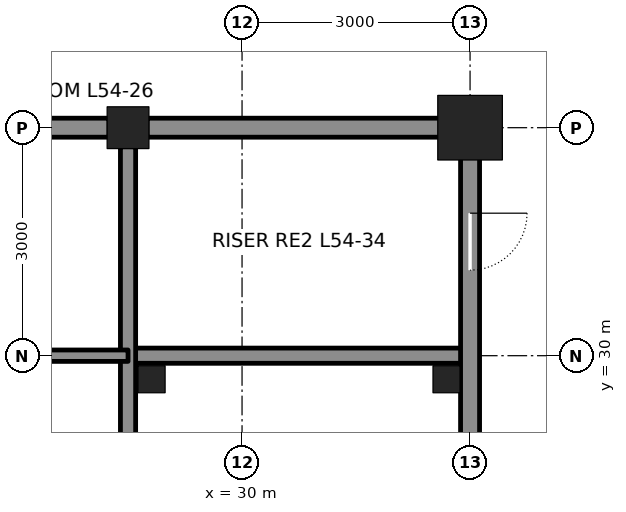
"""IFC4 building model, lengths in metres.
Left out: names, types, materials, properties, quantities, classifications, styles, units other than length and angle.
Written with IfcOpenShell. Run it as: python <this file> out.ifc"""

import sys

from ifc_helpers import new_model, si_unit, direction, frame, frame_2d, origin, origin_2d, place, context, subcontext, project, spatial, rectangle, hollow_rectangle, extrude, element, fill, save


model = new_model("IFC4")
c1 = context("Model", 3, precision=1e-05, world=origin(), true_north=direction((0.0, 1.0)))
c2 = subcontext(c1, "Body", "Model", "MODEL_VIEW")
j1 = project(units=[si_unit("LENGTHUNIT", "METRE"), si_unit("PLANEANGLEUNIT", "RADIAN")], contexts=[c1])
p1 = place(None, origin())
s1 = spatial("IfcSite", under=j1, at=p1, CompositionType="ELEMENT")
p2 = place(p1, origin())
s2 = spatial("IfcBuilding", under=s1, at=p2, CompositionType="ELEMENT")
p3 = place(p2, frame((0.0, 0.0, 243.3)))
s3 = spatial("IfcBuildingStorey", under=s2, at=p3, CompositionType="ELEMENT", Elevation=243.3)
p4 = place(p3, frame((28.5, 33.0, 0.0), z_axis=(0.0, 0.0, 1.0), x_axis=(1.0, 0.0, 0.0)))
e1 = element("IfcColumn", 1, at=p4, inside=s3, PredefinedType="COLUMN", context=c2, shape_type="SweptSolid", body=[
    extrude(hollow_rectangle(XDim=0.55, YDim=0.55, WallThickness=0.045, at=origin_2d()), origin(), (0.0, 0.0, 1.0), 4.2),
])
p5 = place(p3, frame((33.0, 33.0, 0.0), z_axis=(0.0, 0.0, 1.0), x_axis=(1.0, 0.0, 0.0)))
e2 = element("IfcColumn", 2, at=p5, inside=s3, PredefinedType="COLUMN", context=c2, shape_type="SweptSolid", body=[
    extrude(hollow_rectangle(XDim=0.85, YDim=0.85, WallThickness=0.085, at=origin_2d()), origin(), (0.0, 0.0, 1.0), 4.2),
])
p6 = place(p3, frame((28.5, 30.0, 0.0), z_axis=(0.0, 0.0, 1.0), x_axis=(1.0, 0.0, 0.0)))
e3 = element("IfcWall", 3, at=p6, inside=s3, PredefinedType="SOLIDWALL", context=c2, shape_type="SweptSolid", body=[
    extrude(rectangle(XDim=4.5, YDim=0.2, at=frame_2d((2.25, 0.0))), origin(), (0.0, 0.0, 1.0), 4.04),
])
p7 = place(p3, frame((25.75, 33.0, 0.0), z_axis=(0.0, 0.0, 1.0), x_axis=(1.0, 0.0, 0.0)))
e4 = element("IfcWall", 4, at=p7, inside=s3, PredefinedType="SOLIDWALL", context=c2, shape_type="SweptSolid", body=[
    extrude(rectangle(XDim=2.5, YDim=0.25, at=frame_2d((1.25, 0.0))), origin(), (0.0, 0.0, 1.0), 3.181),
])
p8 = place(p3, frame((28.75, 33.0, 0.0), z_axis=(0.0, 0.0, 1.0), x_axis=(1.0, 0.0, 0.0)))
e5 = element("IfcWall", 5, at=p8, inside=s3, PredefinedType="SOLIDWALL", context=c2, shape_type="SweptSolid", body=[
    extrude(rectangle(XDim=4.0, YDim=0.25, at=frame_2d((2.0, 0.0))), origin(), (0.0, 0.0, 1.0), 3.181),
])
p9 = place(p3, frame((28.5, 24.25, 0.0), z_axis=(0.0, 0.0, 1.0), x_axis=(0.0, 1.0, 0.0)))
e6 = element("IfcWall", 6, at=p9, inside=s3, PredefinedType="SOLIDWALL", context=c2, shape_type="SweptSolid", body=[
    extrude(rectangle(XDim=8.5, YDim=0.2, at=frame_2d((4.25, 0.0))), origin(), (0.0, 0.0, 1.0), 3.113),
])
p10 = place(p3, frame((33.0, 24.25, 0.0), z_axis=(0.0, 0.0, 1.0), x_axis=(0.0, 1.0, 0.0)))
e7 = element("IfcWall", 7, at=p10, inside=s3, PredefinedType="SOLIDWALL", context=c2, shape_type="SweptSolid", body=[
    extrude(rectangle(XDim=8.5, YDim=0.25, at=frame_2d((4.25, 0.0))), origin(), (0.0, 0.0, 1.0), 3.113),
])
p11 = place(p10, frame((6.875, 0.0, 0.0)))
e8 = element("IfcOpeningElement", 8, at=p11, cuts=e7, PredefinedType="OPENING", context=c2, shape_type="SweptSolid", body=[
    extrude(rectangle(XDim=0.75, YDim=2.1, at=frame_2d((0.375, 1.05))), frame((0.0, 0.135, 0.0), z_axis=(0.0, -1.0, 0.0), x_axis=(1.0, 0.0, 0.0)), (0.0, 0.0, 1.0), 0.27),
])
p12 = place(p3, frame((25.5, 30.0, 0.0), z_axis=(0.0, 0.0, 1.0), x_axis=(1.0, 0.0, 0.0)))
e9 = element("IfcWall", 9, at=p12, inside=s3, PredefinedType="PARTITIONING", context=c2, shape_type="SweptSolid", body=[
    extrude(rectangle(XDim=3.0, YDim=0.15, at=frame_2d((1.5, 0.0))), origin(), (0.0, 0.0, 1.0), 4.04),
])
for number, where, z_axis, x_axis in (
    (10, (28.81, 29.69, 0.0), (0.0, 0.0, 1.0), (1.0, 0.0, 0.0)),
    (11, (32.69, 29.69, 0.0), (0.0, 0.0, 1.0), (1.0, 0.0, 0.0)),
):
    element("IfcColumn", number, at=place(p3, frame(where, z_axis=z_axis, x_axis=x_axis)), inside=s3, PredefinedType="COLUMN", context=c2, shape_type="SweptSolid", body=[
        extrude(hollow_rectangle(XDim=0.356, YDim=0.356, WallThickness=0.009, at=origin_2d()), origin(), (0.0, 0.0, 1.0), 4.2),
    ])
p13 = place(p11, frame((0.75, 0.0, 0.0), z_axis=(0.0, 0.0, 1.0), x_axis=(-1.0, 0.0, 0.0)))
e12 = element("IfcDoor", 12, at=p13, inside=s3, OperationType="SINGLE_SWING_LEFT", PredefinedType="DOOR", context=c2, shape_type="SweptSolid", body=[
    extrude(rectangle(XDim=0.75, YDim=2.1, at=frame_2d((0.375, 1.05))), frame((0.0, 0.025, 0.0), z_axis=(0.0, -1.0, 0.0), x_axis=(1.0, 0.0, 0.0)), (0.0, 0.0, 1.0), 0.05),
])
fill(e8, e12)
save(model, sys.argv[1])
